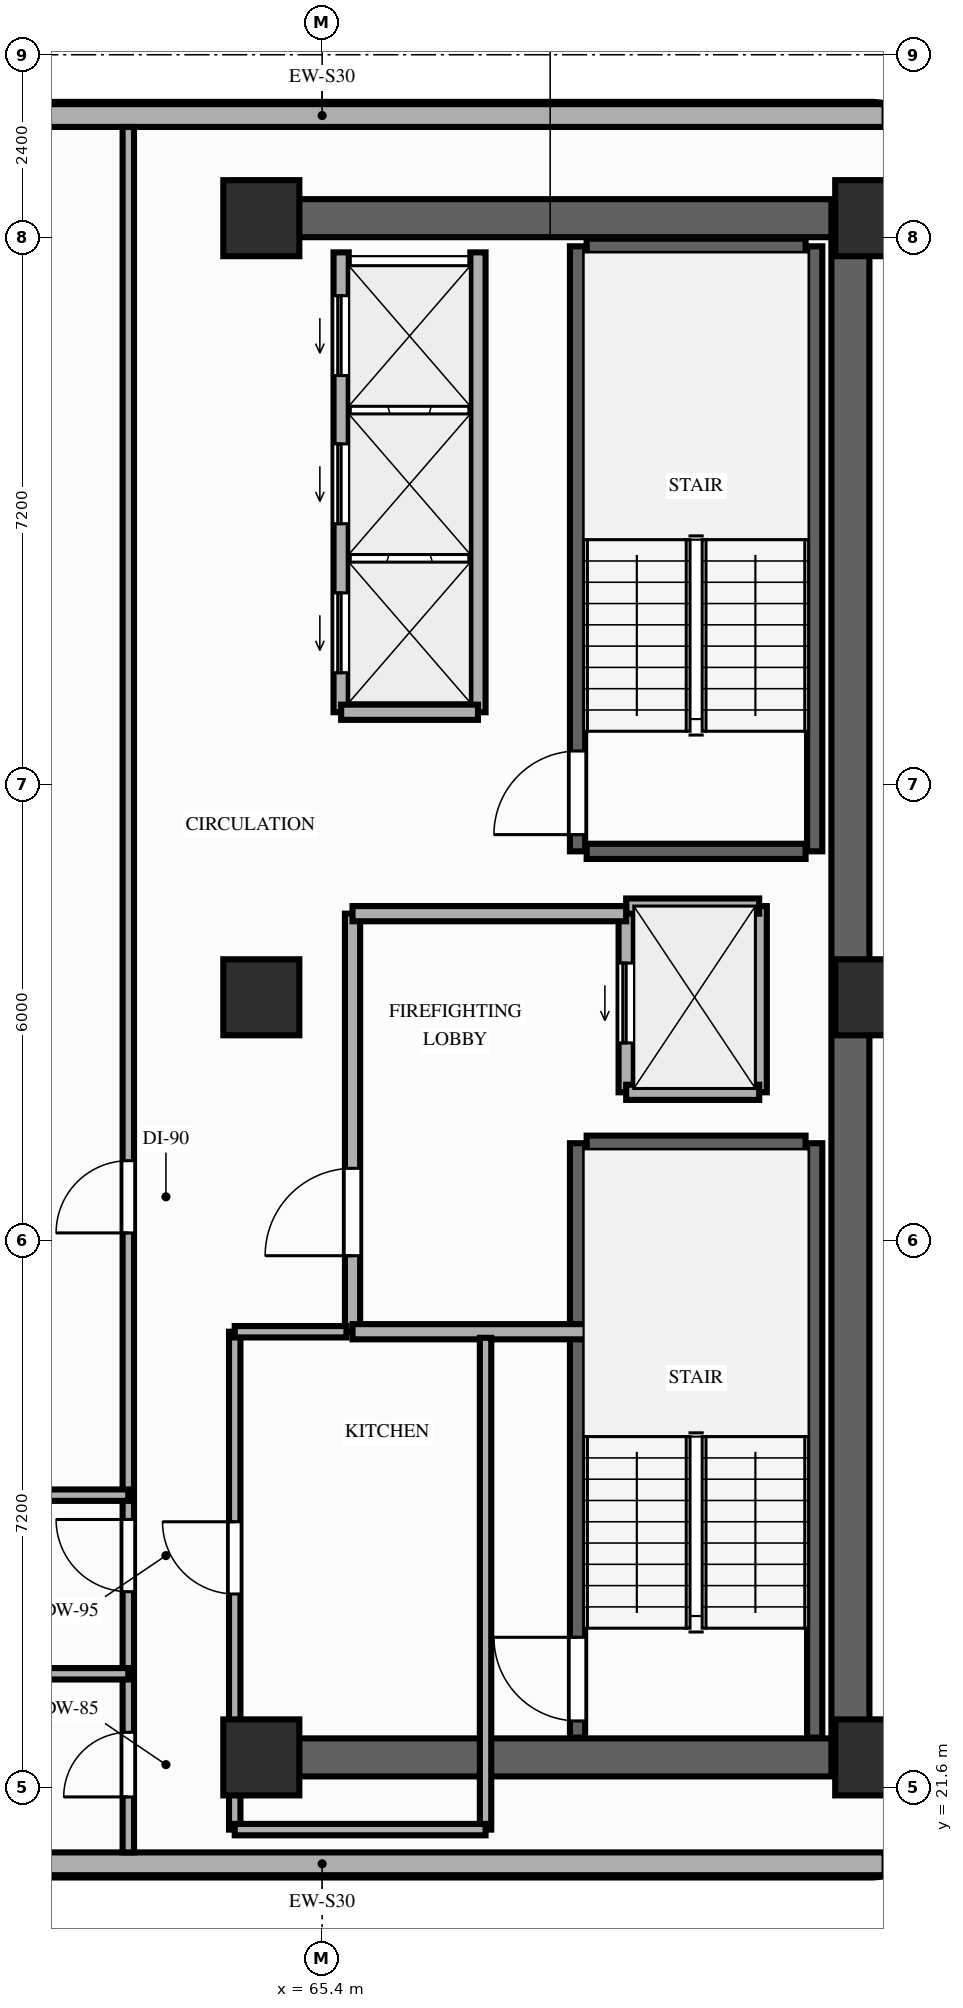
"""IFC4 building model, lengths in metres.
Left out: names, types, materials, properties, quantities, classifications, styles, units other than length and angle.
Written with IfcOpenShell. Run it as: python <this file> out.ifc"""

import sys

from ifc_helpers import new_model, si_unit, direction, frame, frame_2d, origin, origin_2d, place, context, subcontext, project, spatial, rectangle, extrude, element, fill, save


model = new_model("IFC4")
c1 = context("Model", 3, precision=1e-05, world=origin(), true_north=direction((0.0, 1.0)))
c2 = subcontext(c1, "Body", "Model", "MODEL_VIEW")
j1 = project(units=[si_unit("LENGTHUNIT", "METRE"), si_unit("PLANEANGLEUNIT", "RADIAN")], contexts=[c1])
p1 = place(None, origin())
s1 = spatial("IfcSite", under=j1, at=p1, CompositionType="ELEMENT")
p2 = place(p1, origin())
s2 = spatial("IfcBuilding", under=s1, at=p2, CompositionType="ELEMENT")
p3 = place(p2, frame((0.0, 0.0, 99.4)))
s3 = spatial("IfcBuildingStorey", under=s2, at=p3, CompositionType="ELEMENT", Elevation=99.4)
for number, where, z_axis, x_axis in (
    (1, (64.6, 22.0, 0.0), (0.0, 0.0, 1.0), (1.0, 0.0, 0.0)),
    (2, (72.65, 22.0, 0.0), (0.0, 0.0, 1.0), (1.0, 0.0, 0.0)),
    (3, (64.6, 32.0, 0.0), (0.0, 0.0, 1.0), (1.0, 0.0, 0.0)),
    (4, (72.65, 32.0, 0.0), (0.0, 0.0, 1.0), (1.0, 0.0, 0.0)),
    (5, (64.6, 42.25, 0.0), (0.0, 0.0, 1.0), (1.0, 0.0, 0.0)),
    (6, (72.65, 42.25, 0.0), (0.0, 0.0, 1.0), (1.0, 0.0, 0.0)),
):
    element("IfcColumn", number, at=place(p3, frame(where, z_axis=z_axis, x_axis=x_axis)), inside=s3, PredefinedType="COLUMN", context=c2, shape_type="SweptSolid", body=[
        extrude(rectangle(XDim=1.0, YDim=1.0, at=origin_2d()), origin(), (0.0, 0.0, 1.0), 3.2),
    ])
for number, where, z_axis, x_axis in (
    (7, (72.8, 43.6, 0.0), (0.0, 0.0, 1.0), (-1.0, 0.0, 0.0)),
    (8, (58.0, 20.6, 0.0), (0.0, 0.0, 1.0), (1.0, 0.0, 0.0)),
):
    element("IfcWall", number, at=place(p3, frame(where, z_axis=z_axis, x_axis=x_axis)), inside=s3, PredefinedType="STANDARD", context=c2, shape_type="SweptSolid", body=[
        extrude(rectangle(XDim=14.8, YDim=0.3, at=frame_2d((7.4, 0.0))), origin(), (0.0, 0.0, 1.0), 2.96),
    ])
p4 = place(p3, frame((72.35, 22.0, 0.0), z_axis=(0.0, 0.0, 1.0), x_axis=(0.0, 1.0, 0.0)))
e9 = element("IfcWall", 9, at=p4, inside=s3, PredefinedType="SHEAR", context=c2, shape_type="SweptSolid", body=[
    extrude(rectangle(XDim=20.25, YDim=0.5, at=frame_2d((10.125, 0.0))), origin(), (0.0, 0.0, 1.0), 2.96),
])
for number, where, z_axis, x_axis in (
    (10, (64.6, 42.25, 0.0), (0.0, 0.0, 1.0), (1.0, 0.0, 0.0)),
    (11, (64.6, 22.0, 0.0), (0.0, 0.0, 1.0), (1.0, 0.0, 0.0)),
):
    element("IfcWall", number, at=place(p3, frame(where, z_axis=z_axis, x_axis=x_axis)), inside=s3, PredefinedType="SHEAR", context=c2, shape_type="SweptSolid", body=[
        extrude(rectangle(XDim=7.5, YDim=0.5, at=frame_2d((3.75, 0.0))), origin(), (0.0, 0.0, 1.0), 2.96),
    ])
p5 = place(p3, frame((68.76, 22.26, 0.0), z_axis=(0.0, 0.0, 1.0), x_axis=(0.0, 1.0, 0.0)))
e12 = element("IfcWall", 12, at=p5, inside=s3, PredefinedType="SHEAR", context=c2, shape_type="SweptSolid", body=[
    extrude(rectangle(XDim=7.82, YDim=0.2, at=frame_2d((3.91, 0.0))), origin(), (0.0, 0.0, 1.0), 2.96),
])
p6 = place(p5, frame((0.22, 0.0, 0.0)))
e13 = element("IfcOpeningElement", 13, at=p6, cuts=e12, PredefinedType="OPENING", context=c2, shape_type="SweptSolid", body=[
    extrude(rectangle(XDim=1.1, YDim=2.15, at=frame_2d((0.55, 1.075))), frame((0.0, 0.11, 0.0), z_axis=(0.0, -1.0, 0.0), x_axis=(1.0, 0.0, 0.0)), (0.0, 0.0, 1.0), 0.22),
])
p7 = place(p3, frame((71.88, 22.26, 0.0), z_axis=(0.0, 0.0, 1.0), x_axis=(0.0, 1.0, 0.0)))
e14 = element("IfcWall", 14, at=p7, inside=s3, PredefinedType="SHEAR", context=c2, shape_type="SweptSolid", body=[
    extrude(rectangle(XDim=7.82, YDim=0.2, at=frame_2d((3.91, 0.0))), origin(), (0.0, 0.0, 1.0), 2.96),
])
p8 = place(p3, frame((68.88, 30.08, 0.0), z_axis=(0.0, 0.0, 1.0), x_axis=(1.0, 0.0, 0.0)))
e15 = element("IfcWall", 15, at=p8, inside=s3, PredefinedType="SHEAR", context=c2, shape_type="SweptSolid", body=[
    extrude(rectangle(XDim=2.88, YDim=0.2, at=frame_2d((1.44, 0.0))), origin(), (0.0, 0.0, 1.0), 2.96),
])
p9 = place(p3, frame((68.76, 33.92, 0.0), z_axis=(0.0, 0.0, 1.0), x_axis=(0.0, 1.0, 0.0)))
e16 = element("IfcWall", 16, at=p9, inside=s3, PredefinedType="SHEAR", context=c2, shape_type="SweptSolid", body=[
    extrude(rectangle(XDim=7.96, YDim=0.2, at=frame_2d((3.98, 0.0))), origin(), (0.0, 0.0, 1.0), 2.96),
])
p10 = place(p9, frame((0.22, 0.0, 0.0)))
e17 = element("IfcOpeningElement", 17, at=p10, cuts=e16, PredefinedType="OPENING", context=c2, shape_type="SweptSolid", body=[
    extrude(rectangle(XDim=1.1, YDim=2.15, at=frame_2d((0.55, 1.075))), frame((0.0, 0.11, 0.0), z_axis=(0.0, -1.0, 0.0), x_axis=(1.0, 0.0, 0.0)), (0.0, 0.0, 1.0), 0.22),
])
p11 = place(p3, frame((71.88, 33.92, 0.0), z_axis=(0.0, 0.0, 1.0), x_axis=(0.0, 1.0, 0.0)))
e18 = element("IfcWall", 18, at=p11, inside=s3, PredefinedType="SHEAR", context=c2, shape_type="SweptSolid", body=[
    extrude(rectangle(XDim=7.96, YDim=0.2, at=frame_2d((3.98, 0.0))), origin(), (0.0, 0.0, 1.0), 2.96),
])
for number, where, z_axis, x_axis in (
    (19, (68.88, 41.88, 0.0), (0.0, 0.0, 1.0), (1.0, 0.0, 0.0)),
    (20, (68.88, 33.92, 0.0), (0.0, 0.0, 1.0), (1.0, 0.0, 0.0)),
):
    element("IfcWall", number, at=place(p3, frame(where, z_axis=z_axis, x_axis=x_axis)), inside=s3, PredefinedType="SHEAR", context=c2, shape_type="SweptSolid", body=[
        extrude(rectangle(XDim=2.88, YDim=0.2, at=frame_2d((1.44, 0.0))), origin(), (0.0, 0.0, 1.0), 2.96),
    ])
p12 = place(p3, frame((65.65, 35.75, 0.0), z_axis=(0.0, 0.0, 1.0), x_axis=(0.0, 1.0, 0.0)))
e21 = element("IfcWall", 21, at=p12, inside=s3, PredefinedType="MOVABLE", context=c2, shape_type="SweptSolid", body=[
    extrude(rectangle(XDim=6.05, YDim=0.2, at=frame_2d((3.025, 0.0))), origin(), (0.0, 0.0, 1.0), 2.96),
])
p13 = place(p12, frame((0.52, 0.0, 0.0)))
e22 = element("IfcOpeningElement", 22, at=p13, cuts=e21, PredefinedType="OPENING", context=c2, shape_type="SweptSolid", body=[
    extrude(rectangle(XDim=1.05, YDim=2.15, at=frame_2d((0.525, 1.075))), frame((0.0, 0.11, 0.0), z_axis=(0.0, -1.0, 0.0), x_axis=(1.0, 0.0, 0.0)), (0.0, 0.0, 1.0), 0.22),
])
p14 = place(p12, frame((2.48, 0.0, 0.0)))
e23 = element("IfcOpeningElement", 23, at=p14, cuts=e21, PredefinedType="OPENING", context=c2, shape_type="SweptSolid", body=[
    extrude(rectangle(XDim=1.05, YDim=2.15, at=frame_2d((0.525, 1.075))), frame((0.0, 0.11, 0.0), z_axis=(0.0, -1.0, 0.0), x_axis=(1.0, 0.0, 0.0)), (0.0, 0.0, 1.0), 0.22),
])
p15 = place(p12, frame((4.43, 0.0, 0.0)))
e24 = element("IfcOpeningElement", 24, at=p15, cuts=e21, PredefinedType="OPENING", context=c2, shape_type="SweptSolid", body=[
    extrude(rectangle(XDim=1.05, YDim=2.15, at=frame_2d((0.525, 1.075))), frame((0.0, 0.11, 0.0), z_axis=(0.0, -1.0, 0.0), x_axis=(1.0, 0.0, 0.0)), (0.0, 0.0, 1.0), 0.22),
])
p16 = place(p3, frame((67.45, 35.75, 0.0), z_axis=(0.0, 0.0, 1.0), x_axis=(0.0, 1.0, 0.0)))
e25 = element("IfcWall", 25, at=p16, inside=s3, PredefinedType="MOVABLE", context=c2, shape_type="SweptSolid", body=[
    extrude(rectangle(XDim=6.05, YDim=0.2, at=frame_2d((3.025, 0.0))), origin(), (0.0, 0.0, 1.0), 2.96),
])
p17 = place(p3, frame((65.65, 35.75, 0.0), z_axis=(0.0, 0.0, 1.0), x_axis=(1.0, 0.0, 0.0)))
e26 = element("IfcWall", 26, at=p17, inside=s3, PredefinedType="MOVABLE", context=c2, shape_type="SweptSolid", body=[
    extrude(rectangle(XDim=1.8, YDim=0.2, at=frame_2d((0.9, 0.0))), origin(), (0.0, 0.0, 1.0), 2.96),
])
p18 = place(p3, frame((69.4, 30.75, 0.0), z_axis=(0.0, 0.0, 1.0), x_axis=(0.0, 1.0, 0.0)))
e27 = element("IfcWall", 27, at=p18, inside=s3, PredefinedType="MOVABLE", context=c2, shape_type="SweptSolid", body=[
    extrude(rectangle(XDim=2.45, YDim=0.2, at=frame_2d((1.225, 0.0))), origin(), (0.0, 0.0, 1.0), 2.96),
])
p19 = place(p18, frame((0.65, 0.0, 0.0)))
e28 = element("IfcOpeningElement", 28, at=p19, cuts=e27, PredefinedType="OPENING", context=c2, shape_type="SweptSolid", body=[
    extrude(rectangle(XDim=1.05, YDim=2.15, at=frame_2d((0.525, 1.075))), frame((0.0, 0.11, 0.0), z_axis=(0.0, -1.0, 0.0), x_axis=(1.0, 0.0, 0.0)), (0.0, 0.0, 1.0), 0.22),
])
p20 = place(p3, frame((71.15, 30.75, 0.0), z_axis=(0.0, 0.0, 1.0), x_axis=(0.0, 1.0, 0.0)))
e29 = element("IfcWall", 29, at=p20, inside=s3, PredefinedType="MOVABLE", context=c2, shape_type="SweptSolid", body=[
    extrude(rectangle(XDim=2.45, YDim=0.2, at=frame_2d((1.225, 0.0))), origin(), (0.0, 0.0, 1.0), 2.96),
])
for number, where, z_axis, x_axis in (
    (30, (69.4, 33.2, 0.0), (0.0, 0.0, 1.0), (1.0, 0.0, 0.0)),
    (31, (69.4, 30.75, 0.0), (0.0, 0.0, 1.0), (1.0, 0.0, 0.0)),
):
    element("IfcWall", number, at=place(p3, frame(where, z_axis=z_axis, x_axis=x_axis)), inside=s3, PredefinedType="MOVABLE", context=c2, shape_type="SweptSolid", body=[
        extrude(rectangle(XDim=1.75, YDim=0.2, at=frame_2d((0.875, 0.0))), origin(), (0.0, 0.0, 1.0), 2.96),
    ])
p21 = place(p3, frame((65.8, 27.6, 0.0), z_axis=(0.0, 0.0, 1.0), x_axis=(0.0, 1.0, 0.0)))
e32 = element("IfcWall", 32, at=p21, inside=s3, PredefinedType="PARTITIONING", context=c2, shape_type="SweptSolid", body=[
    extrude(rectangle(XDim=5.5, YDim=0.2, at=frame_2d((2.75, 0.0))), origin(), (0.0, 0.0, 1.0), 2.96),
])
p22 = place(p21, frame((1.0, 0.0, 0.0)))
e33 = element("IfcOpeningElement", 33, at=p22, cuts=e32, PredefinedType="OPENING", context=c2, shape_type="SweptSolid", body=[
    extrude(rectangle(XDim=1.15, YDim=2.15, at=frame_2d((0.575, 1.075))), frame((0.0, 0.11, 0.0), z_axis=(0.0, -1.0, 0.0), x_axis=(1.0, 0.0, 0.0)), (0.0, 0.0, 1.0), 0.22),
])
p23 = place(p3, frame((65.8, 33.1, 0.0), z_axis=(0.0, 0.0, 1.0), x_axis=(1.0, 0.0, 0.0)))
e34 = element("IfcWall", 34, at=p23, inside=s3, PredefinedType="PARTITIONING", context=c2, shape_type="SweptSolid", body=[
    extrude(rectangle(XDim=3.6, YDim=0.2, at=frame_2d((1.8, 0.0))), origin(), (0.0, 0.0, 1.0), 2.96),
])
p24 = place(p3, frame((65.8, 27.6, 0.0), z_axis=(0.0, 0.0, 1.0), x_axis=(1.0, 0.0, 0.0)))
e35 = element("IfcWall", 35, at=p24, inside=s3, PredefinedType="PARTITIONING", context=c2, shape_type="SweptSolid", body=[
    extrude(rectangle(XDim=3.4, YDim=0.2, at=frame_2d((1.7, 0.0))), origin(), (0.0, 0.0, 1.0), 2.96),
])
p25 = place(p3, frame((64.25, 21.05, 0.0), z_axis=(0.0, 0.0, 1.0), x_axis=(0.0, 1.0, 0.0)))
e36 = element("IfcWall", 36, at=p25, inside=s3, PredefinedType="PARTITIONING", context=c2, shape_type="SweptSolid", body=[
    extrude(rectangle(XDim=6.55, YDim=0.15, at=frame_2d((3.275, 0.0))), origin(), (0.0, 0.0, 1.0), 2.54),
])
p26 = place(p25, frame((3.1, 0.0, 0.0)))
e37 = element("IfcOpeningElement", 37, at=p26, cuts=e36, PredefinedType="OPENING", context=c2, shape_type="SweptSolid", body=[
    extrude(rectangle(XDim=0.95, YDim=2.15, at=frame_2d((0.475, 1.075))), frame((0.0, 0.085, 0.0), z_axis=(0.0, -1.0, 0.0), x_axis=(1.0, 0.0, 0.0)), (0.0, 0.0, 1.0), 0.17),
])
p27 = place(p3, frame((67.55, 21.05, 0.0), z_axis=(0.0, 0.0, 1.0), x_axis=(0.0, 1.0, 0.0)))
e38 = element("IfcWall", 38, at=p27, inside=s3, PredefinedType="PARTITIONING", context=c2, shape_type="SweptSolid", body=[
    extrude(rectangle(XDim=6.47, YDim=0.15, at=frame_2d((3.235, 0.0))), origin(), (0.0, 0.0, 1.0), 2.54),
])
p28 = place(p3, frame((64.25, 21.05, 0.0), z_axis=(0.0, 0.0, 1.0), x_axis=(1.0, 0.0, 0.0)))
e39 = element("IfcWall", 39, at=p28, inside=s3, PredefinedType="PARTITIONING", context=c2, shape_type="SweptSolid", body=[
    extrude(rectangle(XDim=3.3, YDim=0.15, at=frame_2d((1.65, 0.0))), origin(), (0.0, 0.0, 1.0), 2.96),
])
p29 = place(p3, frame((64.25, 27.6, 0.0), z_axis=(0.0, 0.0, 1.0), x_axis=(1.0, 0.0, 0.0)))
e40 = element("IfcWall", 40, at=p29, inside=s3, PredefinedType="PARTITIONING", context=c2, shape_type="SweptSolid", body=[
    extrude(rectangle(XDim=1.47, YDim=0.15, at=frame_2d((0.735, 0.0))), origin(), (0.0, 0.0, 1.0), 2.54),
])
p30 = place(p3, frame((62.85, 20.75, 0.0), z_axis=(0.0, 0.0, 1.0), x_axis=(0.0, 1.0, 0.0)))
e41 = element("IfcWall", 41, at=p30, inside=s3, PredefinedType="PARTITIONING", context=c2, shape_type="SweptSolid", body=[
    extrude(rectangle(XDim=22.7, YDim=0.15, at=frame_2d((11.35, 0.0))), origin(), (0.0, 0.0, 1.0), 2.54),
])
p31 = place(p30, frame((0.73, 0.0, 0.0)))
e42 = element("IfcOpeningElement", 42, at=p31, cuts=e41, PredefinedType="OPENING", context=c2, shape_type="SweptSolid", body=[
    extrude(rectangle(XDim=0.85, YDim=2.1, at=frame_2d((0.425, 1.05))), frame((0.0, 0.085, 0.0), z_axis=(0.0, -1.0, 0.0), x_axis=(1.0, 0.0, 0.0)), (0.0, 0.0, 1.0), 0.17),
])
p32 = place(p30, frame((3.43, 0.0, 0.0)))
e43 = element("IfcOpeningElement", 43, at=p32, cuts=e41, PredefinedType="OPENING", context=c2, shape_type="SweptSolid", body=[
    extrude(rectangle(XDim=0.95, YDim=2.1, at=frame_2d((0.475, 1.05))), frame((0.0, 0.085, 0.0), z_axis=(0.0, -1.0, 0.0), x_axis=(1.0, 0.0, 0.0)), (0.0, 0.0, 1.0), 0.17),
])
p33 = place(p30, frame((8.15, 0.0, 0.0)))
e44 = element("IfcOpeningElement", 44, at=p33, cuts=e41, PredefinedType="OPENING", context=c2, shape_type="SweptSolid", body=[
    extrude(rectangle(XDim=0.95, YDim=2.15, at=frame_2d((0.475, 1.075))), frame((0.0, 0.085, 0.0), z_axis=(0.0, -1.0, 0.0), x_axis=(1.0, 0.0, 0.0)), (0.0, 0.0, 1.0), 0.17),
])
for number, where, z_axis, x_axis in (
    (45, (57.95, 23.1, 0.0), (0.0, 0.0, 1.0), (1.0, 0.0, 0.0)),
    (46, (57.95, 25.45, 0.0), (0.0, 0.0, 1.0), (1.0, 0.0, 0.0)),
):
    element("IfcWall", number, at=place(p3, frame(where, z_axis=z_axis, x_axis=x_axis)), inside=s3, PredefinedType="PARTITIONING", context=c2, shape_type="SweptSolid", body=[
        extrude(rectangle(XDim=4.9, YDim=0.15, at=frame_2d((2.45, 0.0))), origin(), (0.0, 0.0, 1.0), 2.54),
    ])
p34 = place(p6, origin())
e47 = element("IfcDoor", 47, at=p34, inside=s3, OperationType="SINGLE_SWING_RIGHT", PredefinedType="DOOR", context=c2, shape_type="SweptSolid", body=[
    extrude(rectangle(XDim=1.1, YDim=2.15, at=frame_2d((0.55, 1.075))), frame((0.0, 0.025, 0.0), z_axis=(0.0, -1.0, 0.0), x_axis=(1.0, 0.0, 0.0)), (0.0, 0.0, 1.0), 0.05),
])
fill(e13, e47)
p35 = place(p10, origin())
e48 = element("IfcDoor", 48, at=p35, inside=s3, OperationType="SINGLE_SWING_LEFT", PredefinedType="DOOR", context=c2, shape_type="SweptSolid", body=[
    extrude(rectangle(XDim=1.1, YDim=2.15, at=frame_2d((0.55, 1.075))), frame((0.0, 0.025, 0.0), z_axis=(0.0, -1.0, 0.0), x_axis=(1.0, 0.0, 0.0)), (0.0, 0.0, 1.0), 0.05),
])
fill(e17, e48)
p36 = place(p13, origin())
e49 = element("IfcDoor", 49, at=p36, inside=s3, OperationType="SLIDING_TO_LEFT", PredefinedType="DOOR", context=c2, shape_type="SweptSolid", body=[
    extrude(rectangle(XDim=1.05, YDim=2.15, at=frame_2d((0.525, 1.075))), frame((0.0, 0.025, 0.0), z_axis=(0.0, -1.0, 0.0), x_axis=(1.0, 0.0, 0.0)), (0.0, 0.0, 1.0), 0.05),
])
fill(e22, e49)
p37 = place(p14, origin())
e50 = element("IfcDoor", 50, at=p37, inside=s3, OperationType="SLIDING_TO_LEFT", PredefinedType="DOOR", context=c2, shape_type="SweptSolid", body=[
    extrude(rectangle(XDim=1.05, YDim=2.15, at=frame_2d((0.525, 1.075))), frame((0.0, 0.025, 0.0), z_axis=(0.0, -1.0, 0.0), x_axis=(1.0, 0.0, 0.0)), (0.0, 0.0, 1.0), 0.05),
])
fill(e23, e50)
p38 = place(p15, origin())
e51 = element("IfcDoor", 51, at=p38, inside=s3, OperationType="SLIDING_TO_LEFT", PredefinedType="DOOR", context=c2, shape_type="SweptSolid", body=[
    extrude(rectangle(XDim=1.05, YDim=2.15, at=frame_2d((0.525, 1.075))), frame((0.0, 0.025, 0.0), z_axis=(0.0, -1.0, 0.0), x_axis=(1.0, 0.0, 0.0)), (0.0, 0.0, 1.0), 0.05),
])
fill(e24, e51)
p39 = place(p19, origin())
e52 = element("IfcDoor", 52, at=p39, inside=s3, OperationType="SLIDING_TO_LEFT", PredefinedType="DOOR", context=c2, shape_type="SweptSolid", body=[
    extrude(rectangle(XDim=1.05, YDim=2.15, at=frame_2d((0.525, 1.075))), frame((0.0, 0.025, 0.0), z_axis=(0.0, -1.0, 0.0), x_axis=(1.0, 0.0, 0.0)), (0.0, 0.0, 1.0), 0.05),
])
fill(e28, e52)
p40 = place(p22, origin())
e53 = element("IfcDoor", 53, at=p40, inside=s3, OperationType="SINGLE_SWING_LEFT", PredefinedType="DOOR", context=c2, shape_type="SweptSolid", body=[
    extrude(rectangle(XDim=1.15, YDim=2.15, at=frame_2d((0.575, 1.075))), frame((0.0, 0.025, 0.0), z_axis=(0.0, -1.0, 0.0), x_axis=(1.0, 0.0, 0.0)), (0.0, 0.0, 1.0), 0.05),
])
fill(e33, e53)
p41 = place(p26, origin())
e54 = element("IfcDoor", 54, at=p41, inside=s3, OperationType="SINGLE_SWING_RIGHT", PredefinedType="DOOR", context=c2, shape_type="SweptSolid", body=[
    extrude(rectangle(XDim=0.95, YDim=2.15, at=frame_2d((0.475, 1.075))), frame((0.0, 0.025, 0.0), z_axis=(0.0, -1.0, 0.0), x_axis=(1.0, 0.0, 0.0)), (0.0, 0.0, 1.0), 0.05),
])
fill(e37, e54)
p42 = place(p31, origin())
e55 = element("IfcDoor", 55, at=p42, inside=s3, OperationType="SINGLE_SWING_LEFT", PredefinedType="DOOR", context=c2, shape_type="SweptSolid", body=[
    extrude(rectangle(XDim=0.85, YDim=2.1, at=frame_2d((0.425, 1.05))), frame((0.0, 0.025, 0.0), z_axis=(0.0, -1.0, 0.0), x_axis=(1.0, 0.0, 0.0)), (0.0, 0.0, 1.0), 0.05),
])
fill(e42, e55)
p43 = place(p32, origin())
e56 = element("IfcDoor", 56, at=p43, inside=s3, OperationType="SINGLE_SWING_RIGHT", PredefinedType="DOOR", context=c2, shape_type="SweptSolid", body=[
    extrude(rectangle(XDim=0.95, YDim=2.1, at=frame_2d((0.475, 1.05))), frame((0.0, 0.025, 0.0), z_axis=(0.0, -1.0, 0.0), x_axis=(1.0, 0.0, 0.0)), (0.0, 0.0, 1.0), 0.05),
])
fill(e43, e56)
p44 = place(p33, origin())
e57 = element("IfcDoor", 57, at=p44, inside=s3, OperationType="SINGLE_SWING_LEFT", PredefinedType="DOOR", context=c2, shape_type="SweptSolid", body=[
    extrude(rectangle(XDim=0.95, YDim=2.15, at=frame_2d((0.475, 1.075))), frame((0.0, 0.025, 0.0), z_axis=(0.0, -1.0, 0.0), x_axis=(1.0, 0.0, 0.0)), (0.0, 0.0, 1.0), 0.05),
])
fill(e44, e57)
save(model, sys.argv[1])
